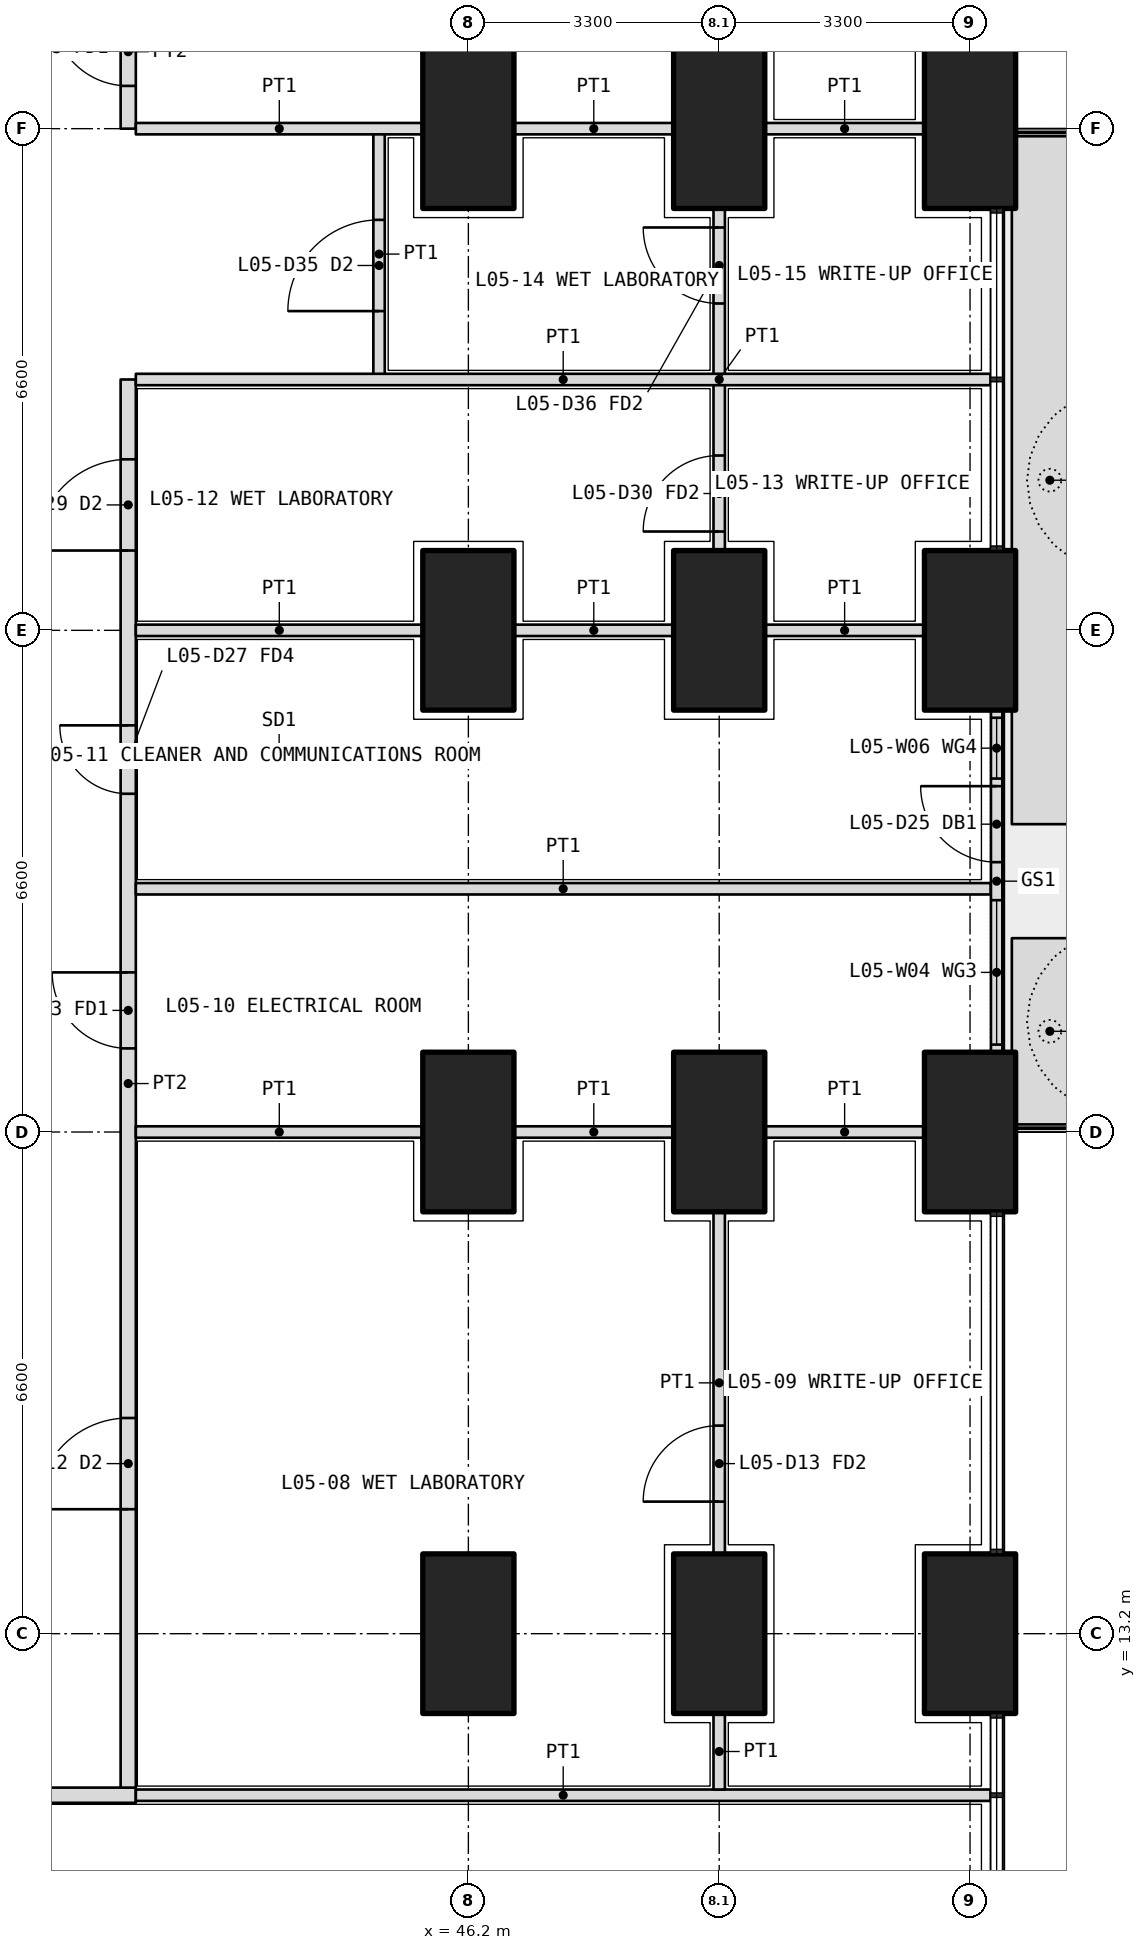
"""IFC4 building model, lengths in metres.
Left out: names, types, materials, properties, quantities, classifications, styles, units other than length and angle.
Written with IfcOpenShell. Run it as: python <this file> out.ifc"""

import sys

from ifc_helpers import new_model, si_unit, direction, frame, frame_2d, origin, origin_2d, place, context, subcontext, project, spatial, polyline, rectangle, outline, extrude, element, fill, save


model = new_model("IFC4")
c1 = context("Model", 3, precision=1e-05, world=origin(), true_north=direction((0.0, 1.0)))
c2 = subcontext(c1, "Body", "Model", "MODEL_VIEW")
j1 = project(units=[si_unit("LENGTHUNIT", "METRE"), si_unit("PLANEANGLEUNIT", "RADIAN")], contexts=[c1])
p1 = place(None, origin())
s1 = spatial("IfcSite", under=j1, at=p1, CompositionType="ELEMENT")
p2 = place(p1, origin())
s2 = spatial("IfcBuilding", under=s1, at=p2, CompositionType="ELEMENT")
p3 = place(p2, frame((0.0, 0.0, 25.5)))
s3 = spatial("IfcBuildingStorey", under=s2, at=p3, CompositionType="ELEMENT", Elevation=25.5)
for number, where, z_axis, x_axis in (
    (1, (52.8, 13.2, 0.0), (0.0, 0.0, 1.0), (0.0, 1.0, 0.0)),
    (2, (52.8, 19.8, 0.0), (0.0, 0.0, 1.0), (0.0, 1.0, 0.0)),
    (3, (52.8, 26.4, 0.0), (0.0, 0.0, 1.0), (0.0, 1.0, 0.0)),
    (4, (52.8, 33.0, 0.0), (0.0, 0.0, 1.0), (0.0, 1.0, 0.0)),
    (5, (49.5, 13.2, 0.0), (0.0, 0.0, 1.0), (0.0, 1.0, 0.0)),
    (6, (49.5, 19.8, 0.0), (0.0, 0.0, 1.0), (0.0, 1.0, 0.0)),
    (7, (49.5, 26.4, 0.0), (0.0, 0.0, 1.0), (0.0, 1.0, 0.0)),
    (8, (49.5, 33.0, 0.0), (0.0, 0.0, 1.0), (0.0, 1.0, 0.0)),
    (9, (46.2, 13.2, 0.0), (0.0, 0.0, 1.0), (0.0, 1.0, 0.0)),
    (10, (46.2, 19.8, 0.0), (0.0, 0.0, 1.0), (0.0, 1.0, 0.0)),
    (11, (46.2, 26.4, 0.0), (0.0, 0.0, 1.0), (0.0, 1.0, 0.0)),
    (12, (46.2, 33.0, 0.0), (0.0, 0.0, 1.0), (0.0, 1.0, 0.0)),
):
    element("IfcColumn", number, at=place(p3, frame(where, z_axis=z_axis, x_axis=x_axis)), inside=s3, PredefinedType="COLUMN", context=c2, shape_type="SweptSolid", body=[
        extrude(rectangle(XDim=2.1, YDim=1.2, at=origin_2d()), origin(), (0.0, 0.0, 1.0), 4.2),
    ])
p4 = place(p3, origin())
e13 = element("IfcWall", 13, at=p4, inside=s3, PredefinedType="USERDEFINED", context=c2, shape_type="SweptSolid", body=[
    extrude(outline(polyline([(53.35, 19.9), (54.35, 19.9), (54.35, 22.35), (53.35, 22.35), (53.35, 19.9)]), holes=[polyline([(53.5, 20.05), (54.2, 20.05), (54.2, 22.2), (53.5, 22.2), (53.5, 20.05)])]), origin(), (0.0, 0.0, 1.0), 1.05),
])
p5 = place(p3, origin())
e14 = element("IfcWall", 14, at=p5, inside=s3, PredefinedType="USERDEFINED", context=c2, shape_type="SweptSolid", body=[
    extrude(outline(polyline([(53.35, 23.85), (54.35, 23.85), (54.35, 32.9), (53.35, 32.9), (53.35, 23.85)]), holes=[polyline([(53.5, 24.0), (54.2, 24.0), (54.2, 32.75), (53.5, 32.75), (53.5, 24.0)])]), origin(), (0.0, 0.0, 1.0), 1.05),
])
p6 = place(p3, frame((53.15, 20.85, 0.0), z_axis=(0.0, 0.0, 1.0), x_axis=(0.0, 1.0, 0.0)))
e15 = element("IfcWall", 15, at=p6, inside=s3, PredefinedType="SOLIDWALL", context=c2, shape_type="SweptSolid", body=[
    extrude(rectangle(XDim=4.5, YDim=0.15, at=frame_2d((2.25, 0.0))), origin(), (0.0, 0.0, 1.0), 2.7),
])
p7 = place(p6, frame((2.5, 0.0, 0.0)))
e16 = element("IfcOpeningElement", 16, at=p7, cuts=e15, PredefinedType="OPENING", context=c2, shape_type="SweptSolid", body=[
    extrude(rectangle(XDim=1.0, YDim=2.4, at=frame_2d((0.5, 1.2))), frame((0.0, 0.085, 0.0), z_axis=(0.0, -1.0, 0.0), x_axis=(1.0, 0.0, 0.0)), (0.0, 0.0, 1.0), 0.17),
])
p8 = place(p6, frame((0.1, 0.0, 0.1)))
e17 = element("IfcOpeningElement", 17, at=p8, cuts=e15, PredefinedType="OPENING", context=c2, shape_type="SweptSolid", body=[
    extrude(rectangle(XDim=1.9, YDim=2.3, at=frame_2d((0.95, 1.15))), frame((0.0, 0.085, 0.0), z_axis=(0.0, -1.0, 0.0), x_axis=(1.0, 0.0, 0.0)), (0.0, 0.0, 1.0), 0.17),
])
p9 = place(p6, frame((3.6, 0.0, 0.1)))
e18 = element("IfcOpeningElement", 18, at=p9, cuts=e15, PredefinedType="OPENING", context=c2, shape_type="SweptSolid", body=[
    extrude(rectangle(XDim=0.8, YDim=2.3, at=frame_2d((0.4, 1.15))), frame((0.0, 0.085, 0.0), z_axis=(0.0, -1.0, 0.0), x_axis=(1.0, 0.0, 0.0)), (0.0, 0.0, 1.0), 0.17),
])
p10 = place(p3, frame((10.975, 11.075, 0.0), z_axis=(0.0, 0.0, 1.0), x_axis=(1.0, 0.0, 0.0)))
e19 = element("IfcWall", 19, at=p10, inside=s3, PredefinedType="PARTITIONING", context=c2, shape_type="SweptSolid", body=[
    extrude(rectangle(XDim=30.85, YDim=0.2, at=frame_2d((15.425, 0.0))), origin(), (0.0, 0.0, 1.0), 2.85),
])
p11 = place(p10, frame((0.663, 0.0, 0.0)))
e20 = element("IfcOpeningElement", 20, at=p11, cuts=e19, PredefinedType="OPENING", context=c2, shape_type="SweptSolid", body=[
    extrude(rectangle(XDim=1.0, YDim=2.1, at=frame_2d((0.5, 1.05))), frame((0.0, 0.11, 0.0), z_axis=(0.0, -1.0, 0.0), x_axis=(1.0, 0.0, 0.0)), (0.0, 0.0, 1.0), 0.22),
])
p12 = place(p10, frame((8.325, 0.0, 0.0)))
e21 = element("IfcOpeningElement", 21, at=p12, cuts=e19, PredefinedType="OPENING", context=c2, shape_type="SweptSolid", body=[
    extrude(rectangle(XDim=1.0, YDim=2.1, at=frame_2d((0.5, 1.05))), frame((0.0, 0.11, 0.0), z_axis=(0.0, -1.0, 0.0), x_axis=(1.0, 0.0, 0.0)), (0.0, 0.0, 1.0), 0.22),
])
p13 = place(p10, frame((19.875, 0.0, 0.0)))
e22 = element("IfcOpeningElement", 22, at=p13, cuts=e19, PredefinedType="OPENING", context=c2, shape_type="SweptSolid", body=[
    extrude(rectangle(XDim=1.0, YDim=2.1, at=frame_2d((0.5, 1.05))), frame((0.0, 0.11, 0.0), z_axis=(0.0, -1.0, 0.0), x_axis=(1.0, 0.0, 0.0)), (0.0, 0.0, 1.0), 0.22),
])
p14 = place(p10, frame((27.538, 0.0, 0.0)))
e23 = element("IfcOpeningElement", 23, at=p14, cuts=e19, PredefinedType="OPENING", context=c2, shape_type="SweptSolid", body=[
    extrude(rectangle(XDim=1.0, YDim=2.1, at=frame_2d((0.5, 1.05))), frame((0.0, 0.11, 0.0), z_axis=(0.0, -1.0, 0.0), x_axis=(1.0, 0.0, 0.0)), (0.0, 0.0, 1.0), 0.22),
])
p15 = place(p3, frame((41.725, 11.175, 0.0), z_axis=(0.0, 0.0, 1.0), x_axis=(0.0, 1.0, 0.0)))
e24 = element("IfcWall", 24, at=p15, inside=s3, PredefinedType="PARTITIONING", context=c2, shape_type="SweptSolid", body=[
    extrude(rectangle(XDim=18.525, YDim=0.2, at=frame_2d((9.262, 0.0))), origin(), (0.0, 0.0, 1.0), 2.85),
])
p16 = place(p15, frame((3.663, 0.0, 0.0)))
e25 = element("IfcOpeningElement", 25, at=p16, cuts=e24, PredefinedType="OPENING", context=c2, shape_type="SweptSolid", body=[
    extrude(rectangle(XDim=1.2, YDim=2.1, at=frame_2d((0.6, 1.05))), frame((0.0, 0.11, 0.0), z_axis=(0.0, -1.0, 0.0), x_axis=(1.0, 0.0, 0.0)), (0.0, 0.0, 1.0), 0.22),
])
p17 = place(p15, frame((9.725, 0.0, 0.0)))
e26 = element("IfcOpeningElement", 26, at=p17, cuts=e24, PredefinedType="OPENING", context=c2, shape_type="SweptSolid", body=[
    extrude(rectangle(XDim=1.0, YDim=2.1, at=frame_2d((0.5, 1.05))), frame((0.0, 0.11, 0.0), z_axis=(0.0, -1.0, 0.0), x_axis=(1.0, 0.0, 0.0)), (0.0, 0.0, 1.0), 0.22),
])
p18 = place(p15, frame((13.075, 0.0, 0.0)))
e27 = element("IfcOpeningElement", 27, at=p18, cuts=e24, PredefinedType="OPENING", context=c2, shape_type="SweptSolid", body=[
    extrude(rectangle(XDim=0.9, YDim=2.1, at=frame_2d((0.45, 1.05))), frame((0.0, 0.11, 0.0), z_axis=(0.0, -1.0, 0.0), x_axis=(1.0, 0.0, 0.0)), (0.0, 0.0, 1.0), 0.22),
])
p19 = place(p15, frame((16.275, 0.0, 0.0)))
e28 = element("IfcOpeningElement", 28, at=p19, cuts=e24, PredefinedType="OPENING", context=c2, shape_type="SweptSolid", body=[
    extrude(rectangle(XDim=1.2, YDim=2.1, at=frame_2d((0.6, 1.05))), frame((0.0, 0.11, 0.0), z_axis=(0.0, -1.0, 0.0), x_axis=(1.0, 0.0, 0.0)), (0.0, 0.0, 1.0), 0.22),
])
p20 = place(p3, frame((41.725, 33.0, 0.0), z_axis=(0.0, 0.0, 1.0), x_axis=(0.0, 1.0, 0.0)))
e29 = element("IfcWall", 29, at=p20, inside=s3, PredefinedType="PARTITIONING", context=c2, shape_type="SweptSolid", body=[
    extrude(rectangle(XDim=2.025, YDim=0.2, at=frame_2d((1.012, 0.0))), origin(), (0.0, 0.0, 1.0), 2.85),
])
p21 = place(p20, frame((0.562, 0.0, 0.0)))
e30 = element("IfcOpeningElement", 30, at=p21, cuts=e29, PredefinedType="OPENING", context=c2, shape_type="SweptSolid", body=[
    extrude(rectangle(XDim=1.0, YDim=2.1, at=frame_2d((0.5, 1.05))), frame((0.0, 0.11, 0.0), z_axis=(0.0, -1.0, 0.0), x_axis=(1.0, 0.0, 0.0)), (0.0, 0.0, 1.0), 0.22),
])
p22 = place(p3, frame((53.07, 11.075, 0.0), z_axis=(0.0, 0.0, 1.0), x_axis=(-1.0, 0.0, 0.0)))
e31 = element("IfcWall", 31, at=p22, inside=s3, PredefinedType="PARTITIONING", context=c2, shape_type="SweptSolid", body=[
    extrude(rectangle(XDim=11.245, YDim=0.15, at=frame_2d((5.623, 0.0))), origin(), (0.0, 0.0, 1.0), 2.7),
])
p23 = place(p3, frame((49.5, 11.15, 0.0), z_axis=(0.0, 0.0, 1.0), x_axis=(0.0, 1.0, 0.0)))
e32 = element("IfcWall", 32, at=p23, inside=s3, PredefinedType="PARTITIONING", context=c2, shape_type="SweptSolid", body=[
    extrude(rectangle(XDim=1.0, YDim=0.15, at=frame_2d((0.5, 0.0))), origin(), (0.0, 0.0, 1.0), 3.9),
])
p24 = place(p3, frame((49.5, 14.25, 0.0), z_axis=(0.0, 0.0, 1.0), x_axis=(0.0, 1.0, 0.0)))
e33 = element("IfcWall", 33, at=p24, inside=s3, PredefinedType="PARTITIONING", context=c2, shape_type="SweptSolid", body=[
    extrude(rectangle(XDim=4.5, YDim=0.15, at=frame_2d((2.25, 0.0))), origin(), (0.0, 0.0, 1.0), 3.9),
])
p25 = place(p24, frame((0.688, 0.0, 0.0)))
e34 = element("IfcOpeningElement", 34, at=p25, cuts=e33, PredefinedType="OPENING", context=c2, shape_type="SweptSolid", body=[
    extrude(rectangle(XDim=1.0, YDim=2.1, at=frame_2d((0.5, 1.05))), frame((0.0, 0.085, 0.0), z_axis=(0.0, -1.0, 0.0), x_axis=(1.0, 0.0, 0.0)), (0.0, 0.0, 1.0), 0.17),
])
p26 = place(p3, frame((49.5, 27.45, 0.0), z_axis=(0.0, 0.0, 1.0), x_axis=(0.0, 1.0, 0.0)))
e35 = element("IfcWall", 35, at=p26, inside=s3, PredefinedType="PARTITIONING", context=c2, shape_type="SweptSolid", body=[
    extrude(rectangle(XDim=4.5, YDim=0.15, at=frame_2d((2.25, 0.0))), origin(), (0.0, 0.0, 1.0), 3.9),
])
p27 = place(p26, frame((0.25, 0.0, 0.0)))
e36 = element("IfcOpeningElement", 36, at=p27, cuts=e35, PredefinedType="OPENING", context=c2, shape_type="SweptSolid", body=[
    extrude(rectangle(XDim=1.0, YDim=2.1, at=frame_2d((0.5, 1.05))), frame((0.0, 0.085, 0.0), z_axis=(0.0, -1.0, 0.0), x_axis=(1.0, 0.0, 0.0)), (0.0, 0.0, 1.0), 0.17),
])
p28 = place(p26, frame((3.25, 0.0, 0.0)))
e37 = element("IfcOpeningElement", 37, at=p28, cuts=e35, PredefinedType="OPENING", context=c2, shape_type="SweptSolid", body=[
    extrude(rectangle(XDim=1.0, YDim=2.1, at=frame_2d((0.5, 1.05))), frame((0.0, 0.085, 0.0), z_axis=(0.0, -1.0, 0.0), x_axis=(1.0, 0.0, 0.0)), (0.0, 0.0, 1.0), 0.17),
])
p29 = place(p3, frame((53.07, 23.0, 0.0), z_axis=(0.0, 0.0, 1.0), x_axis=(-1.0, 0.0, 0.0)))
e38 = element("IfcWall", 38, at=p29, inside=s3, PredefinedType="PARTITIONING", context=c2, shape_type="SweptSolid", body=[
    extrude(rectangle(XDim=11.245, YDim=0.15, at=frame_2d((5.623, 0.0))), origin(), (0.0, 0.0, 1.0), 2.7),
])
for number, where, z_axis, x_axis in (
    (39, (52.2, 26.4, 0.0), (0.0, 0.0, 1.0), (-1.0, 0.0, 0.0)),
    (40, (48.9, 26.4, 0.0), (0.0, 0.0, 1.0), (-1.0, 0.0, 0.0)),
):
    element("IfcWall", number, at=place(p3, frame(where, z_axis=z_axis, x_axis=x_axis)), inside=s3, PredefinedType="PARTITIONING", context=c2, shape_type="SweptSolid", body=[
        extrude(rectangle(XDim=2.1, YDim=0.15, at=frame_2d((1.05, 0.0))), origin(), (0.0, 0.0, 1.0), 2.85),
    ])
p30 = place(p3, frame((45.6, 26.4, 0.0), z_axis=(0.0, 0.0, 1.0), x_axis=(-1.0, 0.0, 0.0)))
e41 = element("IfcWall", 41, at=p30, inside=s3, PredefinedType="PARTITIONING", context=c2, shape_type="SweptSolid", body=[
    extrude(rectangle(XDim=3.775, YDim=0.15, at=frame_2d((1.888, 0.0))), origin(), (0.0, 0.0, 1.0), 2.85),
])
p31 = place(p3, frame((45.025, 29.7, 0.0), z_axis=(0.0, 0.0, 1.0), x_axis=(0.0, 1.0, 0.0)))
e42 = element("IfcWall", 42, at=p31, inside=s3, PredefinedType="PARTITIONING", context=c2, shape_type="SweptSolid", body=[
    extrude(rectangle(XDim=3.3, YDim=0.15, at=frame_2d((1.65, 0.0))), origin(), (0.0, 0.0, 1.0), 2.85),
])
p32 = place(p31, frame((0.9, 0.0, 0.0)))
e43 = element("IfcOpeningElement", 43, at=p32, cuts=e42, PredefinedType="OPENING", context=c2, shape_type="SweptSolid", body=[
    extrude(rectangle(XDim=1.2, YDim=2.1, at=frame_2d((0.6, 1.05))), frame((0.0, 0.085, 0.0), z_axis=(0.0, -1.0, 0.0), x_axis=(1.0, 0.0, 0.0)), (0.0, 0.0, 1.0), 0.17),
])
for number, where, z_axis, x_axis in (
    (44, (52.2, 19.8, 0.0), (0.0, 0.0, 1.0), (-1.0, 0.0, 0.0)),
    (45, (48.9, 19.8, 0.0), (0.0, 0.0, 1.0), (-1.0, 0.0, 0.0)),
):
    element("IfcWall", number, at=place(p3, frame(where, z_axis=z_axis, x_axis=x_axis)), inside=s3, PredefinedType="PARTITIONING", context=c2, shape_type="SweptSolid", body=[
        extrude(rectangle(XDim=2.1, YDim=0.15, at=frame_2d((1.05, 0.0))), origin(), (0.0, 0.0, 1.0), 2.85),
    ])
p33 = place(p3, frame((45.6, 19.8, 0.0), z_axis=(0.0, 0.0, 1.0), x_axis=(-1.0, 0.0, 0.0)))
e46 = element("IfcWall", 46, at=p33, inside=s3, PredefinedType="PARTITIONING", context=c2, shape_type="SweptSolid", body=[
    extrude(rectangle(XDim=3.775, YDim=0.15, at=frame_2d((1.888, 0.0))), origin(), (0.0, 0.0, 1.0), 2.85),
])
p34 = place(p3, frame((53.07, 29.7, 0.0), z_axis=(0.0, 0.0, 1.0), x_axis=(-1.0, 0.0, 0.0)))
e47 = element("IfcWall", 47, at=p34, inside=s3, PredefinedType="PARTITIONING", context=c2, shape_type="SweptSolid", body=[
    extrude(rectangle(XDim=11.245, YDim=0.15, at=frame_2d((5.623, 0.0))), origin(), (0.0, 0.0, 1.0), 2.7),
])
for number, where, z_axis, x_axis in (
    (48, (52.2, 33.0, 0.0), (0.0, 0.0, 1.0), (-1.0, 0.0, 0.0)),
    (49, (48.9, 33.0, 0.0), (0.0, 0.0, 1.0), (-1.0, 0.0, 0.0)),
):
    element("IfcWall", number, at=place(p3, frame(where, z_axis=z_axis, x_axis=x_axis)), inside=s3, PredefinedType="PARTITIONING", context=c2, shape_type="SweptSolid", body=[
        extrude(rectangle(XDim=2.1, YDim=0.15, at=frame_2d((1.05, 0.0))), origin(), (0.0, 0.0, 1.0), 2.85),
    ])
p35 = place(p3, frame((45.6, 33.0, 0.0), z_axis=(0.0, 0.0, 1.0), x_axis=(-1.0, 0.0, 0.0)))
e50 = element("IfcWall", 50, at=p35, inside=s3, PredefinedType="PARTITIONING", context=c2, shape_type="SweptSolid", body=[
    extrude(rectangle(XDim=3.775, YDim=0.15, at=frame_2d((1.888, 0.0))), origin(), (0.0, 0.0, 1.0), 2.85),
])
p36 = place(p7, origin())
e51 = element("IfcDoor", 51, at=p36, inside=s3, OperationType="SINGLE_SWING_RIGHT", PredefinedType="DOOR", context=c2, shape_type="SweptSolid", body=[
    extrude(rectangle(XDim=1.0, YDim=2.4, at=frame_2d((0.5, 1.2))), frame((0.0, 0.025, 0.0), z_axis=(0.0, -1.0, 0.0), x_axis=(1.0, 0.0, 0.0)), (0.0, 0.0, 1.0), 0.05),
])
fill(e16, e51)
p37 = place(p8, origin())
e52 = element("IfcWindow", 52, at=p37, inside=s3, PartitioningType="SINGLE_PANEL", PredefinedType="WINDOW", context=c2, shape_type="SweptSolid", body=[
    extrude(rectangle(XDim=1.9, YDim=2.3, at=frame_2d((0.95, 1.15))), frame((0.0, 0.03, 0.0), z_axis=(0.0, -1.0, 0.0), x_axis=(1.0, 0.0, 0.0)), (0.0, 0.0, 1.0), 0.06),
])
fill(e17, e52)
p38 = place(p9, origin())
e53 = element("IfcWindow", 53, at=p38, inside=s3, PartitioningType="SINGLE_PANEL", PredefinedType="WINDOW", context=c2, shape_type="SweptSolid", body=[
    extrude(rectangle(XDim=0.8, YDim=2.3, at=frame_2d((0.4, 1.15))), frame((0.0, 0.03, 0.0), z_axis=(0.0, -1.0, 0.0), x_axis=(1.0, 0.0, 0.0)), (0.0, 0.0, 1.0), 0.06),
])
fill(e18, e53)
p39 = place(p16, origin())
e54 = element("IfcDoor", 54, at=p39, inside=s3, OperationType="DOUBLE_DOOR_SINGLE_SWING", PredefinedType="DOOR", context=c2, shape_type="SweptSolid", body=[
    extrude(rectangle(XDim=1.2, YDim=2.1, at=frame_2d((0.6, 1.05))), frame((0.0, 0.025, 0.0), z_axis=(0.0, -1.0, 0.0), x_axis=(1.0, 0.0, 0.0)), (0.0, 0.0, 1.0), 0.05),
])
fill(e25, e54)
p40 = place(p25, origin())
e55 = element("IfcDoor", 55, at=p40, inside=s3, OperationType="SINGLE_SWING_LEFT", PredefinedType="DOOR", context=c2, shape_type="SweptSolid", body=[
    extrude(rectangle(XDim=1.0, YDim=2.1, at=frame_2d((0.5, 1.05))), frame((0.0, 0.025, 0.0), z_axis=(0.0, -1.0, 0.0), x_axis=(1.0, 0.0, 0.0)), (0.0, 0.0, 1.0), 0.05),
])
fill(e34, e55)
p41 = place(p17, origin())
e56 = element("IfcDoor", 56, at=p41, inside=s3, OperationType="SINGLE_SWING_RIGHT", PredefinedType="DOOR", context=c2, shape_type="SweptSolid", body=[
    extrude(rectangle(XDim=1.0, YDim=2.1, at=frame_2d((0.5, 1.05))), frame((0.0, 0.025, 0.0), z_axis=(0.0, -1.0, 0.0), x_axis=(1.0, 0.0, 0.0)), (0.0, 0.0, 1.0), 0.05),
])
fill(e26, e56)
p42 = place(p18, origin())
e57 = element("IfcDoor", 57, at=p42, inside=s3, OperationType="SINGLE_SWING_RIGHT", PredefinedType="DOOR", context=c2, shape_type="SweptSolid", body=[
    extrude(rectangle(XDim=0.9, YDim=2.1, at=frame_2d((0.45, 1.05))), frame((0.0, 0.025, 0.0), z_axis=(0.0, -1.0, 0.0), x_axis=(1.0, 0.0, 0.0)), (0.0, 0.0, 1.0), 0.05),
])
fill(e27, e57)
p43 = place(p19, origin())
e58 = element("IfcDoor", 58, at=p43, inside=s3, OperationType="DOUBLE_DOOR_SINGLE_SWING", PredefinedType="DOOR", context=c2, shape_type="SweptSolid", body=[
    extrude(rectangle(XDim=1.2, YDim=2.1, at=frame_2d((0.6, 1.05))), frame((0.0, 0.025, 0.0), z_axis=(0.0, -1.0, 0.0), x_axis=(1.0, 0.0, 0.0)), (0.0, 0.0, 1.0), 0.05),
])
fill(e28, e58)
p44 = place(p27, origin())
e59 = element("IfcDoor", 59, at=p44, inside=s3, OperationType="SINGLE_SWING_LEFT", PredefinedType="DOOR", context=c2, shape_type="SweptSolid", body=[
    extrude(rectangle(XDim=1.0, YDim=2.1, at=frame_2d((0.5, 1.05))), frame((0.0, 0.025, 0.0), z_axis=(0.0, -1.0, 0.0), x_axis=(1.0, 0.0, 0.0)), (0.0, 0.0, 1.0), 0.05),
])
fill(e36, e59)
p45 = place(p32, origin())
e60 = element("IfcDoor", 60, at=p45, inside=s3, OperationType="DOUBLE_DOOR_SINGLE_SWING", PredefinedType="DOOR", context=c2, shape_type="SweptSolid", body=[
    extrude(rectangle(XDim=1.2, YDim=2.1, at=frame_2d((0.6, 1.05))), frame((0.0, 0.025, 0.0), z_axis=(0.0, -1.0, 0.0), x_axis=(1.0, 0.0, 0.0)), (0.0, 0.0, 1.0), 0.05),
])
fill(e43, e60)
p46 = place(p28, origin())
e61 = element("IfcDoor", 61, at=p46, inside=s3, OperationType="SINGLE_SWING_RIGHT", PredefinedType="DOOR", context=c2, shape_type="SweptSolid", body=[
    extrude(rectangle(XDim=1.0, YDim=2.1, at=frame_2d((0.5, 1.05))), frame((0.0, 0.025, 0.0), z_axis=(0.0, -1.0, 0.0), x_axis=(1.0, 0.0, 0.0)), (0.0, 0.0, 1.0), 0.05),
])
fill(e37, e61)
p47 = place(p21, origin())
e62 = element("IfcDoor", 62, at=p47, inside=s3, OperationType="SINGLE_SWING_RIGHT", PredefinedType="DOOR", context=c2, shape_type="SweptSolid", body=[
    extrude(rectangle(XDim=1.0, YDim=2.1, at=frame_2d((0.5, 1.05))), frame((0.0, 0.025, 0.0), z_axis=(0.0, -1.0, 0.0), x_axis=(1.0, 0.0, 0.0)), (0.0, 0.0, 1.0), 0.05),
])
fill(e30, e62)
save(model, sys.argv[1])
